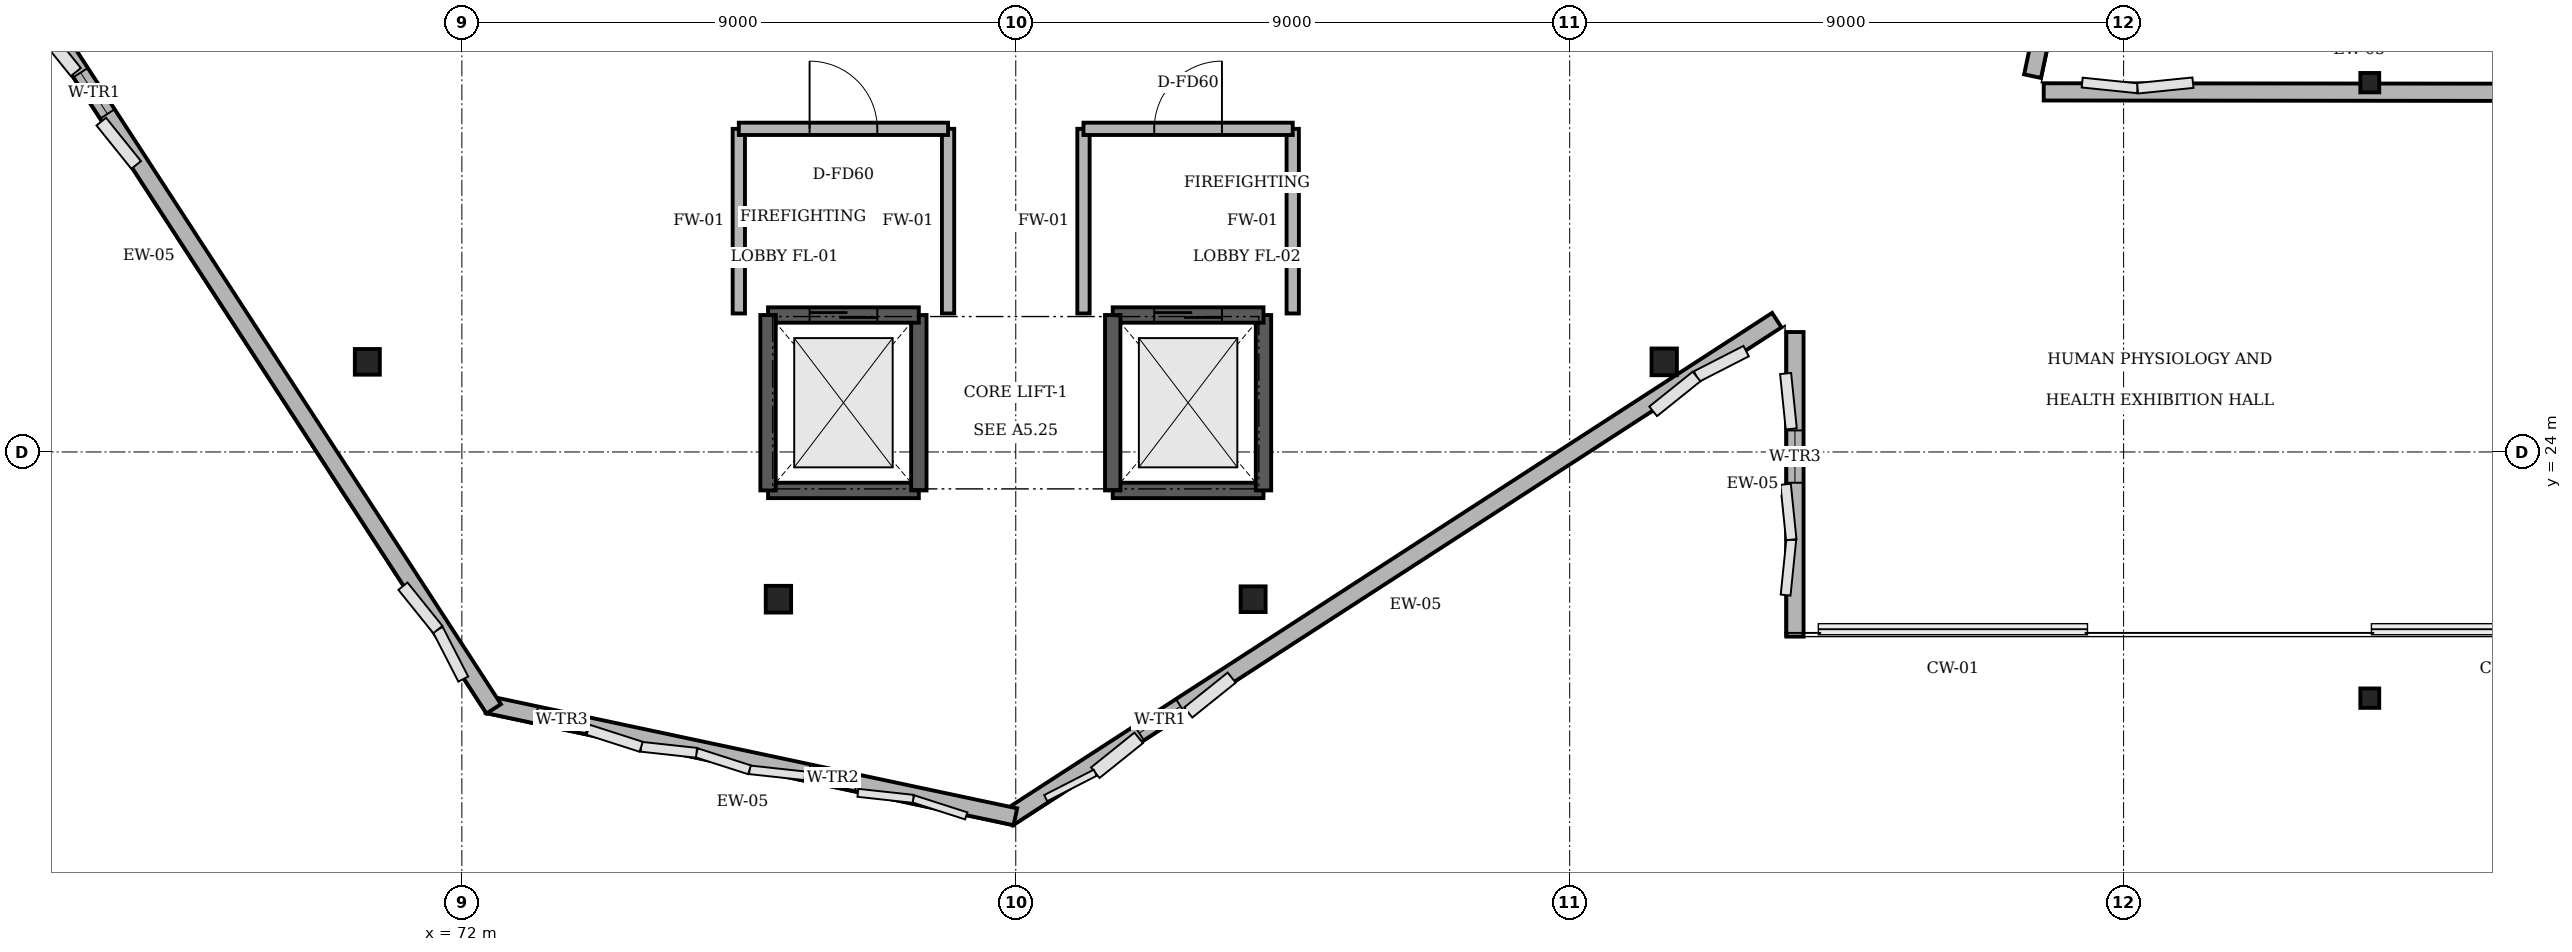
"""IFC4 building model, lengths in metres.
Left out: names, types, materials, properties, quantities, classifications, styles, units other than length and angle.
Written with IfcOpenShell. Run it as: python <this file> out.ifc"""

import sys

from ifc_helpers import new_model, si_unit, direction, frame, frame_2d, origin, origin_2d, place, context, subcontext, project, spatial, rectangle, i_section, extrude, element, fill, save


model = new_model("IFC4")
c1 = context("Model", 3, precision=1e-05, world=origin(), true_north=direction((0.0, 1.0)))
c2 = subcontext(c1, "Body", "Model", "MODEL_VIEW")
j1 = project(units=[si_unit("LENGTHUNIT", "METRE"), si_unit("PLANEANGLEUNIT", "RADIAN")], contexts=[c1])
p1 = place(None, origin())
s1 = spatial("IfcSite", under=j1, at=p1, CompositionType="ELEMENT")
p2 = place(p1, origin())
s2 = spatial("IfcBuilding", under=s1, at=p2, CompositionType="ELEMENT")
p3 = place(p2, frame((0.0, 0.0, 15.6)))
s3 = spatial("IfcBuildingStorey", under=s2, at=p3, CompositionType="ELEMENT", Elevation=15.6)
p4 = place(p3, frame((70.464, 25.464, 0.0), z_axis=(0.0, 0.0, 1.0), x_axis=(1.0, 0.0, 0.0)))
e1 = element("IfcColumn", 1, at=p4, inside=s3, PredefinedType="COLUMN", context=c2, shape_type="SweptSolid", body=[
    extrude(i_section(OverallWidth=0.406, OverallDepth=0.417, WebThickness=0.03, FlangeThickness=0.044, FilletRadius=0.015, at=origin_2d()), origin(), (0.0, 0.0, 1.0), 4.8),
])
p5 = place(p3, frame((77.144, 21.608, 0.0), z_axis=(0.0, 0.0, 1.0), x_axis=(1.0, 0.0, 0.0)))
e2 = element("IfcColumn", 2, at=p5, inside=s3, PredefinedType="COLUMN", context=c2, shape_type="SweptSolid", body=[
    extrude(i_section(OverallWidth=0.412, OverallDepth=0.434, WebThickness=0.036, FlangeThickness=0.044, FilletRadius=0.015, at=origin_2d()), origin(), (0.0, 0.0, 1.0), 4.8),
])
p6 = place(p3, frame((84.856, 21.608, 0.0), z_axis=(0.0, 0.0, 1.0), x_axis=(1.0, 0.0, 0.0)))
e3 = element("IfcColumn", 3, at=p6, inside=s3, PredefinedType="COLUMN", context=c2, shape_type="SweptSolid", body=[
    extrude(i_section(OverallWidth=0.406, OverallDepth=0.417, WebThickness=0.03, FlangeThickness=0.044, FilletRadius=0.015, at=origin_2d()), origin(), (0.0, 0.0, 1.0), 4.8),
])
p7 = place(p3, frame((91.536, 25.464, 0.0), z_axis=(0.0, 0.0, 1.0), x_axis=(1.0, 0.0, 0.0)))
e4 = element("IfcColumn", 4, at=p7, inside=s3, PredefinedType="COLUMN", context=c2, shape_type="SweptSolid", body=[
    extrude(i_section(OverallWidth=0.412, OverallDepth=0.434, WebThickness=0.036, FlangeThickness=0.044, FilletRadius=0.015, at=origin_2d()), origin(), (0.0, 0.0, 1.0), 4.8),
])
for number, where, z_axis, x_axis in (
    (5, (103.0, 20.0, 0.0), (0.0, 0.0, 1.0), (1.0, 0.0, 0.0)),
    (6, (103.0, 30.0, 0.0), (0.0, 0.0, 1.0), (1.0, 0.0, 0.0)),
):
    element("IfcColumn", number, at=place(p3, frame(where, z_axis=z_axis, x_axis=x_axis)), inside=s3, PredefinedType="COLUMN", context=c2, shape_type="SweptSolid", body=[
        extrude(i_section(OverallWidth=0.307, OverallDepth=0.315, WebThickness=0.012, FlangeThickness=0.019, FilletRadius=0.013, at=origin_2d()), origin(), (0.0, 0.0, 1.0), 4.8),
    ])
p8 = place(p3, frame((93.66, 21.0, 0.0), z_axis=(0.0, 0.0, 1.0), x_axis=(-4.9333991e-05, 0.999999998783, 0.0)))
e7 = element("IfcWall", 7, at=p8, inside=s3, PredefinedType="SOLIDWALL", context=c2, shape_type="SweptSolid", body=[
    extrude(rectangle(XDim=4.949, YDim=0.28, at=frame_2d((2.474, 0.0))), origin(), (0.0, 0.0, 1.0), 4.13),
])
p9 = place(p8, frame((2.5, 0.0, 1.05)))
e8 = element("IfcOpeningElement", 8, at=p9, cuts=e7, PredefinedType="OPENING", context=c2, shape_type="SweptSolid", body=[
    extrude(rectangle(XDim=0.85, YDim=1.6, at=frame_2d((0.425, 0.8))), frame((0.0, 0.15, 0.0), z_axis=(0.0, -1.0, 0.0), x_axis=(1.0, 0.0, 0.0)), (0.0, 0.0, 1.0), 0.3),
])
p10 = place(p3, frame((93.365, 26.142, 0.0), z_axis=(0.0, 0.0, 1.0), x_axis=(-0.839308647048, -0.543655217017, 0.0)))
e9 = element("IfcWall", 9, at=p10, inside=s3, PredefinedType="SOLIDWALL", context=c2, shape_type="SweptSolid", body=[
    extrude(rectangle(XDim=14.884, YDim=0.28, at=frame_2d((7.442, 0.0))), origin(), (0.0, 0.0, 1.0), 3.484),
])
p11 = place(p10, frame((11.542, 0.0, 1.05)))
e10 = element("IfcOpeningElement", 10, at=p11, cuts=e9, PredefinedType="OPENING", context=c2, shape_type="SweptSolid", body=[
    extrude(rectangle(XDim=0.8, YDim=1.5, at=frame_2d((0.4, 0.75))), frame((0.0, 0.15, 0.0), z_axis=(0.0, -1.0, 0.0), x_axis=(1.0, 0.0, 0.0)), (0.0, 0.0, 1.0), 0.3),
])
p12 = place(p3, frame((80.994, 18.073, 0.0), z_axis=(0.0, 0.0, 1.0), x_axis=(-0.978148234997, 0.207908706824, 0.0)))
e11 = element("IfcWall", 11, at=p12, inside=s3, PredefinedType="SOLIDWALL", context=c2, shape_type="SweptSolid", body=[
    extrude(rectangle(XDim=8.768, YDim=0.28, at=frame_2d((4.384, 0.0))), origin(), (0.0, 0.0, 1.0), 3.629),
])
p13 = place(p12, frame((2.634, 0.0, 1.05)))
e12 = element("IfcOpeningElement", 12, at=p13, cuts=e11, PredefinedType="OPENING", context=c2, shape_type="SweptSolid", body=[
    extrude(rectangle(XDim=0.8, YDim=1.7, at=frame_2d((0.4, 0.85))), frame((0.0, 0.15, 0.0), z_axis=(0.0, -1.0, 0.0), x_axis=(1.0, 0.0, 0.0)), (0.0, 0.0, 1.0), 0.3),
])
p14 = place(p12, frame((7.109, 0.0, 1.05)))
e13 = element("IfcOpeningElement", 13, at=p14, cuts=e11, PredefinedType="OPENING", context=c2, shape_type="SweptSolid", body=[
    extrude(rectangle(XDim=0.85, YDim=1.6, at=frame_2d((0.425, 0.8))), frame((0.0, 0.15, 0.0), z_axis=(0.0, -1.0, 0.0), x_axis=(1.0, 0.0, 0.0)), (0.0, 0.0, 1.0), 0.3),
])
p15 = place(p3, frame((72.518, 19.826, 0.0), z_axis=(0.0, 0.0, 1.0), x_axis=(-0.544634816414, 0.838673307522, 0.0)))
e14 = element("IfcWall", 14, at=p15, inside=s3, PredefinedType="SOLIDWALL", context=c2, shape_type="SweptSolid", body=[
    extrude(rectangle(XDim=18.45, YDim=0.28, at=frame_2d((9.225, 0.0))), origin(), (0.0, 0.0, 1.0), 3.634),
])
p16 = place(p15, frame((11.525, 0.0, 1.05)))
e15 = element("IfcOpeningElement", 15, at=p16, cuts=e14, PredefinedType="OPENING", context=c2, shape_type="SweptSolid", body=[
    extrude(rectangle(XDim=0.8, YDim=1.5, at=frame_2d((0.4, 0.75))), frame((0.0, 0.15, 0.0), z_axis=(0.0, -1.0, 0.0), x_axis=(1.0, 0.0, 0.0)), (0.0, 0.0, 1.0), 0.3),
])
p17 = place(p15, frame((16.025, 0.0, 1.05)))
e16 = element("IfcOpeningElement", 16, at=p17, cuts=e14, PredefinedType="OPENING", context=c2, shape_type="SweptSolid", body=[
    extrude(rectangle(XDim=0.8, YDim=1.7, at=frame_2d((0.4, 0.85))), frame((0.0, 0.15, 0.0), z_axis=(0.0, -1.0, 0.0), x_axis=(1.0, 0.0, 0.0)), (0.0, 0.0, 1.0), 0.3),
])
p18 = place(p3, frame((99.023, 37.173, 0.0), z_axis=(0.0, 0.0, 1.0), x_axis=(-0.20790199548, -0.978149661491, 0.0)))
e17 = element("IfcWall", 17, at=p18, inside=s3, PredefinedType="SOLIDWALL", context=c2, shape_type="SweptSolid", body=[
    extrude(rectangle(XDim=7.226, YDim=0.28, at=frame_2d((3.613, 0.0))), origin(), (0.0, 0.0, 1.0), 3.626),
])
p19 = place(p18, frame((2.288, 0.0, 1.05)))
e18 = element("IfcOpeningElement", 18, at=p19, cuts=e17, PredefinedType="OPENING", context=c2, shape_type="SweptSolid", body=[
    extrude(rectangle(XDim=0.85, YDim=1.6, at=frame_2d((0.425, 0.8))), frame((0.0, 0.15, 0.0), z_axis=(0.0, -1.0, 0.0), x_axis=(1.0, 0.0, 0.0)), (0.0, 0.0, 1.0), 0.3),
])
p20 = place(p3, frame((97.702, 29.85, 0.0), z_axis=(0.0, 0.0, 1.0), x_axis=(0.999999611629, -0.000881329752, 0.0)))
e19 = element("IfcWall", 19, at=p20, inside=s3, PredefinedType="SOLIDWALL", context=c2, shape_type="SweptSolid", body=[
    extrude(rectangle(XDim=10.25, YDim=0.28, at=frame_2d((5.125, 0.0))), origin(), (0.0, 0.0, 1.0), 3.601),
])
p21 = place(p3, frame((76.975, 23.375, 0.0), z_axis=(0.0, 0.0, 1.0), x_axis=(1.0, 0.0, 0.0)))
e20 = element("IfcWall", 20, at=p21, inside=s3, PredefinedType="SOLIDWALL", context=c2, shape_type="SweptSolid", body=[
    extrude(rectangle(XDim=2.45, YDim=0.25, at=frame_2d((1.225, 0.0))), origin(), (0.0, 0.0, 1.0), 4.8),
])
p22 = place(p3, frame((79.425, 23.375, 0.0), z_axis=(0.0, 0.0, 1.0), x_axis=(0.0, 1.0, 0.0)))
e21 = element("IfcWall", 21, at=p22, inside=s3, PredefinedType="SOLIDWALL", context=c2, shape_type="SweptSolid", body=[
    extrude(rectangle(XDim=2.85, YDim=0.25, at=frame_2d((1.425, 0.0))), origin(), (0.0, 0.0, 1.0), 4.8),
])
p23 = place(p3, frame((79.425, 26.225, 0.0), z_axis=(0.0, 0.0, 1.0), x_axis=(-1.0, 0.0, 0.0)))
e22 = element("IfcWall", 22, at=p23, inside=s3, PredefinedType="SOLIDWALL", context=c2, shape_type="SweptSolid", body=[
    extrude(rectangle(XDim=2.45, YDim=0.25, at=frame_2d((1.225, 0.0))), origin(), (0.0, 0.0, 1.0), 4.8),
])
p24 = place(p23, frame((0.675, 0.0, 0.0)))
e23 = element("IfcOpeningElement", 23, at=p24, cuts=e22, PredefinedType="OPENING", context=c2, shape_type="SweptSolid", body=[
    extrude(rectangle(XDim=1.1, YDim=2.2, at=frame_2d((0.55, 1.1))), frame((0.0, 0.135, 0.0), z_axis=(0.0, -1.0, 0.0), x_axis=(1.0, 0.0, 0.0)), (0.0, 0.0, 1.0), 0.27),
])
p25 = place(p3, frame((76.975, 26.225, 0.0), z_axis=(0.0, 0.0, 1.0), x_axis=(0.0, -1.0, 0.0)))
e24 = element("IfcWall", 24, at=p25, inside=s3, PredefinedType="SOLIDWALL", context=c2, shape_type="SweptSolid", body=[
    extrude(rectangle(XDim=2.85, YDim=0.25, at=frame_2d((1.425, 0.0))), origin(), (0.0, 0.0, 1.0), 4.8),
])
p26 = place(p3, frame((76.5, 26.25, 0.0), z_axis=(0.0, 0.0, 1.0), x_axis=(0.0, 1.0, 0.0)))
e25 = element("IfcWall", 25, at=p26, inside=s3, PredefinedType="SOLIDWALL", context=c2, shape_type="SweptSolid", body=[
    extrude(rectangle(XDim=3.0, YDim=0.2, at=frame_2d((1.5, 0.0))), origin(), (0.0, 0.0, 1.0), 3.629),
])
p27 = place(p3, frame((79.9, 26.25, 0.0), z_axis=(0.0, 0.0, 1.0), x_axis=(0.0, 1.0, 0.0)))
e26 = element("IfcWall", 26, at=p27, inside=s3, PredefinedType="SOLIDWALL", context=c2, shape_type="SweptSolid", body=[
    extrude(rectangle(XDim=3.0, YDim=0.2, at=frame_2d((1.5, 0.0))), origin(), (0.0, 0.0, 1.0), 3.624),
])
p28 = place(p3, frame((76.5, 29.25, 0.0), z_axis=(0.0, 0.0, 1.0), x_axis=(1.0, 0.0, 0.0)))
e27 = element("IfcWall", 27, at=p28, inside=s3, PredefinedType="SOLIDWALL", context=c2, shape_type="SweptSolid", body=[
    extrude(rectangle(XDim=3.4, YDim=0.2, at=frame_2d((1.7, 0.0))), origin(), (0.0, 0.0, 1.0), 3.624),
])
p29 = place(p28, frame((1.15, 0.0, 0.0)))
e28 = element("IfcOpeningElement", 28, at=p29, cuts=e27, PredefinedType="OPENING", context=c2, shape_type="SweptSolid", body=[
    extrude(rectangle(XDim=1.1, YDim=2.2, at=frame_2d((0.55, 1.1))), frame((0.0, 0.11, 0.0), z_axis=(0.0, -1.0, 0.0), x_axis=(1.0, 0.0, 0.0)), (0.0, 0.0, 1.0), 0.22),
])
p30 = place(p3, frame((82.575, 23.375, 0.0), z_axis=(0.0, 0.0, 1.0), x_axis=(1.0, 0.0, 0.0)))
e29 = element("IfcWall", 29, at=p30, inside=s3, PredefinedType="SOLIDWALL", context=c2, shape_type="SweptSolid", body=[
    extrude(rectangle(XDim=2.45, YDim=0.25, at=frame_2d((1.225, 0.0))), origin(), (0.0, 0.0, 1.0), 4.8),
])
p31 = place(p3, frame((85.025, 23.375, 0.0), z_axis=(0.0, 0.0, 1.0), x_axis=(0.0, 1.0, 0.0)))
e30 = element("IfcWall", 30, at=p31, inside=s3, PredefinedType="SOLIDWALL", context=c2, shape_type="SweptSolid", body=[
    extrude(rectangle(XDim=2.85, YDim=0.25, at=frame_2d((1.425, 0.0))), origin(), (0.0, 0.0, 1.0), 4.8),
])
p32 = place(p3, frame((85.025, 26.225, 0.0), z_axis=(0.0, 0.0, 1.0), x_axis=(-1.0, 0.0, 0.0)))
e31 = element("IfcWall", 31, at=p32, inside=s3, PredefinedType="SOLIDWALL", context=c2, shape_type="SweptSolid", body=[
    extrude(rectangle(XDim=2.45, YDim=0.25, at=frame_2d((1.225, 0.0))), origin(), (0.0, 0.0, 1.0), 4.8),
])
p33 = place(p32, frame((0.675, 0.0, 0.0)))
e32 = element("IfcOpeningElement", 32, at=p33, cuts=e31, PredefinedType="OPENING", context=c2, shape_type="SweptSolid", body=[
    extrude(rectangle(XDim=1.1, YDim=2.2, at=frame_2d((0.55, 1.1))), frame((0.0, 0.135, 0.0), z_axis=(0.0, -1.0, 0.0), x_axis=(1.0, 0.0, 0.0)), (0.0, 0.0, 1.0), 0.27),
])
p34 = place(p3, frame((82.575, 26.225, 0.0), z_axis=(0.0, 0.0, 1.0), x_axis=(0.0, -1.0, 0.0)))
e33 = element("IfcWall", 33, at=p34, inside=s3, PredefinedType="SOLIDWALL", context=c2, shape_type="SweptSolid", body=[
    extrude(rectangle(XDim=2.85, YDim=0.25, at=frame_2d((1.425, 0.0))), origin(), (0.0, 0.0, 1.0), 4.8),
])
for number, where, z_axis, x_axis in (
    (34, (82.1, 26.25, 0.0), (0.0, 0.0, 1.0), (0.0, 1.0, 0.0)),
    (35, (85.5, 26.25, 0.0), (0.0, 0.0, 1.0), (0.0, 1.0, 0.0)),
):
    element("IfcWall", number, at=place(p3, frame(where, z_axis=z_axis, x_axis=x_axis)), inside=s3, PredefinedType="SOLIDWALL", context=c2, shape_type="SweptSolid", body=[
        extrude(rectangle(XDim=3.0, YDim=0.2, at=frame_2d((1.5, 0.0))), origin(), (0.0, 0.0, 1.0), 4.0),
    ])
p35 = place(p3, frame((82.1, 29.25, 0.0), z_axis=(0.0, 0.0, 1.0), x_axis=(1.0, 0.0, 0.0)))
e36 = element("IfcWall", 36, at=p35, inside=s3, PredefinedType="SOLIDWALL", context=c2, shape_type="SweptSolid", body=[
    extrude(rectangle(XDim=3.4, YDim=0.2, at=frame_2d((1.7, 0.0))), origin(), (0.0, 0.0, 1.0), 4.0),
])
p36 = place(p35, frame((1.15, 0.0, 0.0)))
e37 = element("IfcOpeningElement", 37, at=p36, cuts=e36, PredefinedType="OPENING", context=c2, shape_type="SweptSolid", body=[
    extrude(rectangle(XDim=1.1, YDim=2.2, at=frame_2d((0.55, 1.1))), frame((0.0, 0.11, 0.0), z_axis=(0.0, -1.0, 0.0), x_axis=(1.0, 0.0, 0.0)), (0.0, 0.0, 1.0), 0.22),
])
p37 = place(p9, origin())
e38 = element("IfcWindow", 38, at=p37, inside=s3, PartitioningType="SINGLE_PANEL", PredefinedType="WINDOW", context=c2, shape_type="SweptSolid", body=[
    extrude(rectangle(XDim=0.85, YDim=1.6, at=frame_2d((0.425, 0.8))), frame((0.0, 0.03, 0.0), z_axis=(0.0, -1.0, 0.0), x_axis=(1.0, 0.0, 0.0)), (0.0, 0.0, 1.0), 0.06),
])
fill(e8, e38)
p38 = place(p11, origin())
e39 = element("IfcWindow", 39, at=p38, inside=s3, PartitioningType="SINGLE_PANEL", PredefinedType="WINDOW", context=c2, shape_type="SweptSolid", body=[
    extrude(rectangle(XDim=0.8, YDim=1.5, at=frame_2d((0.4, 0.75))), frame((0.0, 0.03, 0.0), z_axis=(0.0, -1.0, 0.0), x_axis=(1.0, 0.0, 0.0)), (0.0, 0.0, 1.0), 0.06),
])
fill(e10, e39)
p39 = place(p13, origin())
e40 = element("IfcWindow", 40, at=p39, inside=s3, PartitioningType="SINGLE_PANEL", PredefinedType="WINDOW", context=c2, shape_type="SweptSolid", body=[
    extrude(rectangle(XDim=0.8, YDim=1.7, at=frame_2d((0.4, 0.85))), frame((0.0, 0.03, 0.0), z_axis=(0.0, -1.0, 0.0), x_axis=(1.0, 0.0, 0.0)), (0.0, 0.0, 1.0), 0.06),
])
fill(e12, e40)
p40 = place(p14, origin())
e41 = element("IfcWindow", 41, at=p40, inside=s3, PartitioningType="SINGLE_PANEL", PredefinedType="WINDOW", context=c2, shape_type="SweptSolid", body=[
    extrude(rectangle(XDim=0.85, YDim=1.6, at=frame_2d((0.425, 0.8))), frame((0.0, 0.03, 0.0), z_axis=(0.0, -1.0, 0.0), x_axis=(1.0, 0.0, 0.0)), (0.0, 0.0, 1.0), 0.06),
])
fill(e13, e41)
p41 = place(p16, origin())
e42 = element("IfcWindow", 42, at=p41, inside=s3, PartitioningType="SINGLE_PANEL", PredefinedType="WINDOW", context=c2, shape_type="SweptSolid", body=[
    extrude(rectangle(XDim=0.8, YDim=1.5, at=frame_2d((0.4, 0.75))), frame((0.0, 0.03, 0.0), z_axis=(0.0, -1.0, 0.0), x_axis=(1.0, 0.0, 0.0)), (0.0, 0.0, 1.0), 0.06),
])
fill(e15, e42)
p42 = place(p24, origin())
e43 = element("IfcDoor", 43, at=p42, inside=s3, OperationType="SLIDING_TO_LEFT", PredefinedType="DOOR", context=c2, shape_type="SweptSolid", body=[
    extrude(rectangle(XDim=1.1, YDim=2.2, at=frame_2d((0.55, 1.1))), frame((0.0, 0.025, 0.0), z_axis=(0.0, -1.0, 0.0), x_axis=(1.0, 0.0, 0.0)), (0.0, 0.0, 1.0), 0.05),
])
fill(e23, e43)
p43 = place(p29, origin())
e44 = element("IfcDoor", 44, at=p43, inside=s3, OperationType="SINGLE_SWING_LEFT", PredefinedType="DOOR", context=c2, shape_type="SweptSolid", body=[
    extrude(rectangle(XDim=1.1, YDim=2.2, at=frame_2d((0.55, 1.1))), frame((0.0, 0.025, 0.0), z_axis=(0.0, -1.0, 0.0), x_axis=(1.0, 0.0, 0.0)), (0.0, 0.0, 1.0), 0.05),
])
fill(e28, e44)
p44 = place(p33, origin())
e45 = element("IfcDoor", 45, at=p44, inside=s3, OperationType="SLIDING_TO_LEFT", PredefinedType="DOOR", context=c2, shape_type="SweptSolid", body=[
    extrude(rectangle(XDim=1.1, YDim=2.2, at=frame_2d((0.55, 1.1))), frame((0.0, 0.025, 0.0), z_axis=(0.0, -1.0, 0.0), x_axis=(1.0, 0.0, 0.0)), (0.0, 0.0, 1.0), 0.05),
])
fill(e32, e45)
p45 = place(p36, origin())
e46 = element("IfcDoor", 46, at=p45, inside=s3, OperationType="SINGLE_SWING_RIGHT", PredefinedType="DOOR", context=c2, shape_type="SweptSolid", body=[
    extrude(rectangle(XDim=1.1, YDim=2.2, at=frame_2d((0.55, 1.1))), frame((0.0, 0.025, 0.0), z_axis=(0.0, -1.0, 0.0), x_axis=(1.0, 0.0, 0.0)), (0.0, 0.0, 1.0), 0.05),
])
fill(e37, e46)
save(model, sys.argv[1])
